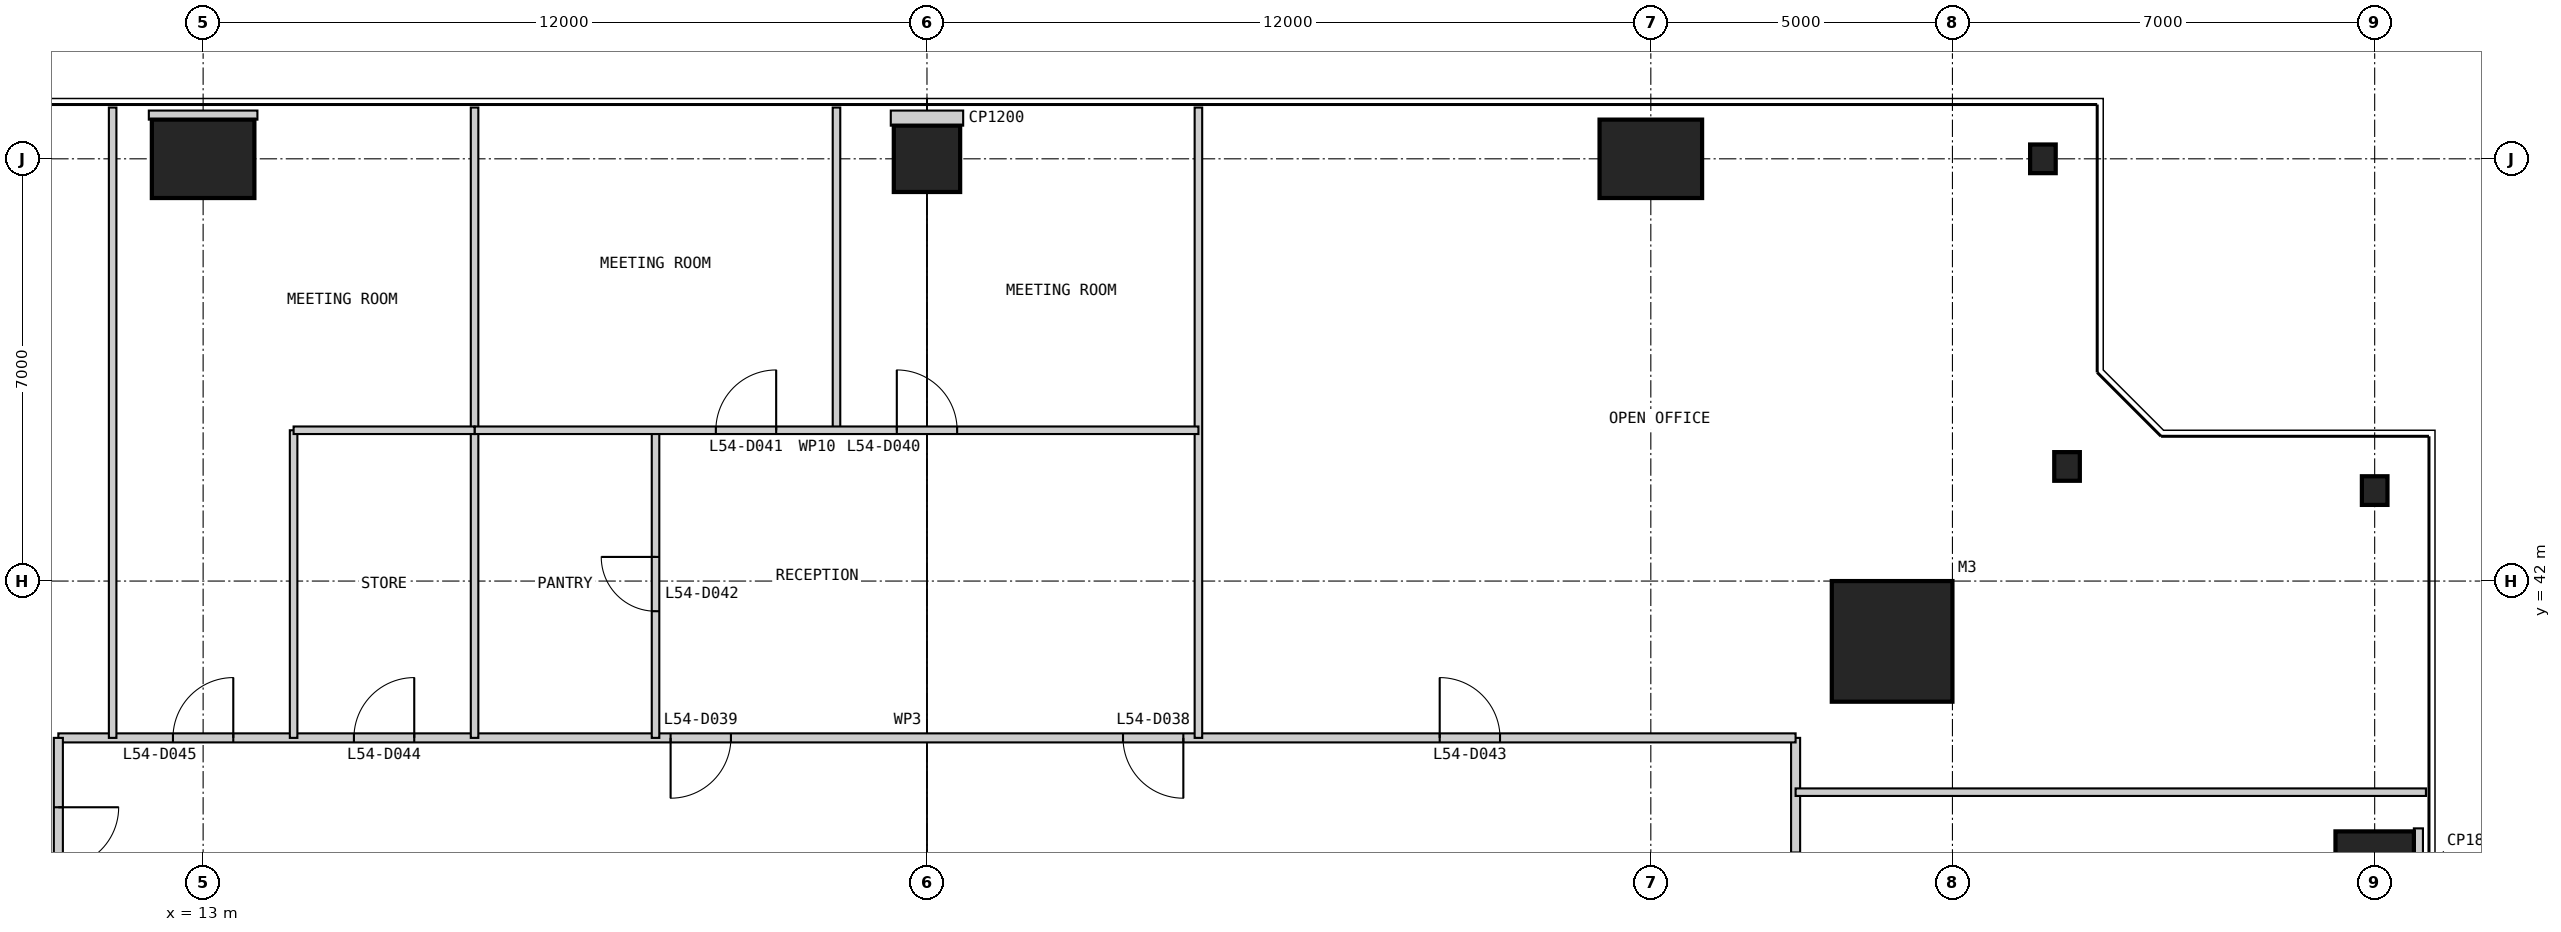
"""IFC4 building model, lengths in metres.
Left out: names, types, materials, properties, quantities, classifications, styles, units other than length and angle.
Written with IfcOpenShell. Run it as: python <this file> out.ifc"""

import sys

from ifc_helpers import new_model, si_unit, direction, frame, frame_2d, origin, origin_2d, place, context, subcontext, project, spatial, rectangle, i_section, extrude, element, fill, save


model = new_model("IFC4")
c1 = context("Model", 3, precision=1e-05, world=origin(), true_north=direction((0.0, 1.0)))
c2 = subcontext(c1, "Body", "Model", "MODEL_VIEW")
j1 = project(units=[si_unit("LENGTHUNIT", "METRE"), si_unit("PLANEANGLEUNIT", "RADIAN")], contexts=[c1])
p1 = place(None, origin())
s1 = spatial("IfcSite", under=j1, at=p1, CompositionType="ELEMENT")
p2 = place(p1, origin())
s2 = spatial("IfcBuilding", under=s1, at=p2, CompositionType="ELEMENT")
p3 = place(p2, frame((0.0, 0.0, 229.8)))
s3 = spatial("IfcBuildingStorey", under=s2, at=p3, CompositionType="ELEMENT", Elevation=229.8)
p4 = place(p3, frame((41.0, 41.0, 0.0), z_axis=(0.0, 0.0, 1.0), x_axis=(1.0, 0.0, 0.0)))
e1 = element("IfcColumn", 1, at=p4, inside=s3, PredefinedType="COLUMN", context=c2, shape_type="SweptSolid", body=[
    extrude(rectangle(XDim=2.0, YDim=2.0, at=origin_2d()), origin(), (0.0, 0.0, 1.0), 4.0),
])
p5 = place(p3, frame((49.0, 37.0, 0.0), z_axis=(0.0, 0.0, 1.0), x_axis=(1.0, 0.0, 0.0)))
e2 = element("IfcColumn", 2, at=p5, inside=s3, PredefinedType="COLUMN", context=c2, shape_type="SweptSolid", body=[
    extrude(rectangle(XDim=1.3, YDim=1.7, at=origin_2d()), origin(), (0.0, 0.0, 1.0), 4.0),
])
for number, where, z_axis, x_axis in (
    (3, (49.0, 43.5, 0.0), (0.0, 0.0, 1.0), (1.0, 0.0, 0.0)),
    (4, (43.9, 43.9, 0.0), (0.0, 0.0, 1.0), (1.0, 0.0, 0.0)),
    (5, (43.5, 49.0, 0.0), (0.0, 0.0, 1.0), (1.0, 0.0, 0.0)),
):
    element("IfcColumn", number, at=place(p3, frame(where, z_axis=z_axis, x_axis=x_axis)), inside=s3, PredefinedType="COLUMN", context=c2, shape_type="SweptSolid", body=[
        extrude(i_section(OverallWidth=0.424, OverallDepth=0.475, WebThickness=0.048, FlangeThickness=0.077, at=origin_2d()), origin(), (0.0, 0.0, 1.0), 4.0),
    ])
p6 = place(p3, frame((37.0, 49.0, 0.0), z_axis=(0.0, 0.0, 1.0), x_axis=(1.0, 0.0, 0.0)))
e6 = element("IfcColumn", 6, at=p6, inside=s3, PredefinedType="COLUMN", context=c2, shape_type="SweptSolid", body=[
    extrude(rectangle(XDim=1.7, YDim=1.3, at=origin_2d()), origin(), (0.0, 0.0, 1.0), 4.0),
])
p7 = place(p3, frame((25.0, 49.0, 0.0), z_axis=(0.0, 0.0, 1.0), x_axis=(1.0, 0.0, 0.0)))
e7 = element("IfcColumn", 7, at=p7, inside=s3, PredefinedType="COLUMN", context=c2, shape_type="SweptSolid", body=[
    extrude(rectangle(XDim=1.1, YDim=1.1, at=origin_2d()), origin(), (0.0, 0.0, 1.0), 4.0),
])
p8 = place(p3, frame((13.0, 49.0, 0.0), z_axis=(0.0, 0.0, 1.0), x_axis=(1.0, 0.0, 0.0)))
e8 = element("IfcColumn", 8, at=p8, inside=s3, PredefinedType="COLUMN", context=c2, shape_type="SweptSolid", body=[
    extrude(rectangle(XDim=1.7, YDim=1.3, at=origin_2d()), origin(), (0.0, 0.0, 1.0), 4.0),
])
p9 = place(p3, frame((39.4, 10.6, 0.0), z_axis=(0.0, 0.0, 1.0), x_axis=(0.0, 1.0, 0.0)))
e9 = element("IfcWall", 9, at=p9, inside=s3, PredefinedType="PARTITIONING", context=c2, shape_type="SweptSolid", body=[
    extrude(rectangle(XDim=28.8, YDim=0.15, at=frame_2d((14.4, 0.0))), origin(), (0.0, 0.0, 1.0), 3.8),
])
p10 = place(p9, frame((10.15, 0.0, 0.0)))
e10 = element("IfcOpeningElement", 10, at=p10, cuts=e9, PredefinedType="OPENING", context=c2, shape_type="SweptSolid", body=[
    extrude(rectangle(XDim=1.0, YDim=2.2, at=frame_2d((0.5, 1.1))), frame((0.0, 0.085, 0.0), z_axis=(0.0, -1.0, 0.0), x_axis=(1.0, 0.0, 0.0)), (0.0, 0.0, 1.0), 0.17),
])
p11 = place(p9, frame((17.65, 0.0, 0.0)))
e11 = element("IfcOpeningElement", 11, at=p11, cuts=e9, PredefinedType="OPENING", context=c2, shape_type="SweptSolid", body=[
    extrude(rectangle(XDim=1.0, YDim=2.2, at=frame_2d((0.5, 1.1))), frame((0.0, 0.085, 0.0), z_axis=(0.0, -1.0, 0.0), x_axis=(1.0, 0.0, 0.0)), (0.0, 0.0, 1.0), 0.17),
])
p12 = place(p9, frame((4.9, 0.0, 0.0)))
e12 = element("IfcOpeningElement", 12, at=p12, cuts=e9, PredefinedType="OPENING", context=c2, shape_type="SweptSolid", body=[
    extrude(rectangle(XDim=1.0, YDim=2.2, at=frame_2d((0.5, 1.1))), frame((0.0, 0.085, 0.0), z_axis=(0.0, -1.0, 0.0), x_axis=(1.0, 0.0, 0.0)), (0.0, 0.0, 1.0), 0.17),
])
p13 = place(p9, frame((22.9, 0.0, 0.0)))
e13 = element("IfcOpeningElement", 13, at=p13, cuts=e9, PredefinedType="OPENING", context=c2, shape_type="SweptSolid", body=[
    extrude(rectangle(XDim=1.0, YDim=2.2, at=frame_2d((0.5, 1.1))), frame((0.0, 0.085, 0.0), z_axis=(0.0, -1.0, 0.0), x_axis=(1.0, 0.0, 0.0)), (0.0, 0.0, 1.0), 0.17),
])
p14 = place(p9, frame((25.9, 0.0, 0.0)))
e14 = element("IfcOpeningElement", 14, at=p14, cuts=e9, PredefinedType="OPENING", context=c2, shape_type="SweptSolid", body=[
    extrude(rectangle(XDim=1.0, YDim=2.2, at=frame_2d((0.5, 1.1))), frame((0.0, 0.085, 0.0), z_axis=(0.0, -1.0, 0.0), x_axis=(1.0, 0.0, 0.0)), (0.0, 0.0, 1.0), 0.17),
])
p15 = place(p3, frame((39.4, 39.4, 0.0), z_axis=(0.0, 0.0, 1.0), x_axis=(-1.0, 0.0, 0.0)))
e15 = element("IfcWall", 15, at=p15, inside=s3, PredefinedType="PARTITIONING", context=c2, shape_type="SweptSolid", body=[
    extrude(rectangle(XDim=28.8, YDim=0.15, at=frame_2d((14.4, 0.0))), origin(), (0.0, 0.0, 1.0), 3.8),
])
p16 = place(p15, frame((10.15, 0.0, 0.0)))
e16 = element("IfcOpeningElement", 16, at=p16, cuts=e15, PredefinedType="OPENING", context=c2, shape_type="SweptSolid", body=[
    extrude(rectangle(XDim=1.0, YDim=2.2, at=frame_2d((0.5, 1.1))), frame((0.0, 0.085, 0.0), z_axis=(0.0, -1.0, 0.0), x_axis=(1.0, 0.0, 0.0)), (0.0, 0.0, 1.0), 0.17),
])
p17 = place(p15, frame((17.65, 0.0, 0.0)))
e17 = element("IfcOpeningElement", 17, at=p17, cuts=e15, PredefinedType="OPENING", context=c2, shape_type="SweptSolid", body=[
    extrude(rectangle(XDim=1.0, YDim=2.2, at=frame_2d((0.5, 1.1))), frame((0.0, 0.085, 0.0), z_axis=(0.0, -1.0, 0.0), x_axis=(1.0, 0.0, 0.0)), (0.0, 0.0, 1.0), 0.17),
])
p18 = place(p15, frame((4.9, 0.0, 0.0)))
e18 = element("IfcOpeningElement", 18, at=p18, cuts=e15, PredefinedType="OPENING", context=c2, shape_type="SweptSolid", body=[
    extrude(rectangle(XDim=1.0, YDim=2.2, at=frame_2d((0.5, 1.1))), frame((0.0, 0.085, 0.0), z_axis=(0.0, -1.0, 0.0), x_axis=(1.0, 0.0, 0.0)), (0.0, 0.0, 1.0), 0.17),
])
p19 = place(p15, frame((22.9, 0.0, 0.0)))
e19 = element("IfcOpeningElement", 19, at=p19, cuts=e15, PredefinedType="OPENING", context=c2, shape_type="SweptSolid", body=[
    extrude(rectangle(XDim=1.0, YDim=2.2, at=frame_2d((0.5, 1.1))), frame((0.0, 0.085, 0.0), z_axis=(0.0, -1.0, 0.0), x_axis=(1.0, 0.0, 0.0)), (0.0, 0.0, 1.0), 0.17),
])
p20 = place(p15, frame((25.9, 0.0, 0.0)))
e20 = element("IfcOpeningElement", 20, at=p20, cuts=e15, PredefinedType="OPENING", context=c2, shape_type="SweptSolid", body=[
    extrude(rectangle(XDim=1.0, YDim=2.2, at=frame_2d((0.5, 1.1))), frame((0.0, 0.085, 0.0), z_axis=(0.0, -1.0, 0.0), x_axis=(1.0, 0.0, 0.0)), (0.0, 0.0, 1.0), 0.17),
])
for number, where, z_axis, x_axis in (
    (21, (49.85, 38.5, 0.0), (0.0, 0.0, 1.0), (-1.0, 0.0, 0.0)),
    (22, (29.5, 49.85, 0.0), (0.0, 0.0, 1.0), (0.0, -1.0, 0.0)),
):
    element("IfcWall", number, at=place(p3, frame(where, z_axis=z_axis, x_axis=x_axis)), inside=s3, PredefinedType="PARTITIONING", context=c2, shape_type="SweptSolid", body=[
        extrude(rectangle(XDim=10.45, YDim=0.125, at=frame_2d((5.225, 0.0))), origin(), (0.0, 0.0, 1.0), 3.8),
    ])
p21 = place(p3, frame((23.5, 49.85, 0.0), z_axis=(0.0, 0.0, 1.0), x_axis=(0.0, -1.0, 0.0)))
e23 = element("IfcWall", 23, at=p21, inside=s3, PredefinedType="PARTITIONING", context=c2, shape_type="SweptSolid", body=[
    extrude(rectangle(XDim=5.35, YDim=0.125, at=frame_2d((2.675, 0.0))), origin(), (0.0, 0.0, 1.0), 3.8),
])
p22 = place(p3, frame((20.5, 44.5, 0.0), z_axis=(0.0, 0.0, 1.0), x_axis=(0.0, -1.0, 0.0)))
e24 = element("IfcWall", 24, at=p22, inside=s3, PredefinedType="PARTITIONING", context=c2, shape_type="SweptSolid", body=[
    extrude(rectangle(XDim=5.1, YDim=0.125, at=frame_2d((2.55, 0.0))), origin(), (0.0, 0.0, 1.0), 3.8),
])
p23 = place(p22, frame((2.1, 0.0, 0.0)))
e25 = element("IfcOpeningElement", 25, at=p23, cuts=e24, PredefinedType="OPENING", context=c2, shape_type="SweptSolid", body=[
    extrude(rectangle(XDim=0.9, YDim=2.2, at=frame_2d((0.45, 1.1))), frame((0.0, 0.073, 0.0), z_axis=(0.0, -1.0, 0.0), x_axis=(1.0, 0.0, 0.0)), (0.0, 0.0, 1.0), 0.145),
])
p24 = place(p3, frame((17.5, 49.85, 0.0), z_axis=(0.0, 0.0, 1.0), x_axis=(0.0, -1.0, 0.0)))
e26 = element("IfcWall", 26, at=p24, inside=s3, PredefinedType="PARTITIONING", context=c2, shape_type="SweptSolid", body=[
    extrude(rectangle(XDim=10.45, YDim=0.125, at=frame_2d((5.225, 0.0))), origin(), (0.0, 0.0, 1.0), 3.8),
])
p25 = place(p3, frame((14.5, 44.5, 0.0), z_axis=(0.0, 0.0, 1.0), x_axis=(0.0, -1.0, 0.0)))
e27 = element("IfcWall", 27, at=p25, inside=s3, PredefinedType="PARTITIONING", context=c2, shape_type="SweptSolid", body=[
    extrude(rectangle(XDim=5.1, YDim=0.125, at=frame_2d((2.55, 0.0))), origin(), (0.0, 0.0, 1.0), 3.8),
])
p26 = place(p3, frame((29.5, 44.5, 0.0), z_axis=(0.0, 0.0, 1.0), x_axis=(-1.0, 0.0, 0.0)))
e28 = element("IfcWall", 28, at=p26, inside=s3, PredefinedType="PARTITIONING", context=c2, shape_type="SweptSolid", body=[
    extrude(rectangle(XDim=12.0, YDim=0.125, at=frame_2d((6.0, 0.0))), origin(), (0.0, 0.0, 1.0), 3.8),
])
p27 = place(p26, frame((4.0, 0.0, 0.0)))
e29 = element("IfcOpeningElement", 29, at=p27, cuts=e28, PredefinedType="OPENING", context=c2, shape_type="SweptSolid", body=[
    extrude(rectangle(XDim=1.0, YDim=2.2, at=frame_2d((0.5, 1.1))), frame((0.0, 0.073, 0.0), z_axis=(0.0, -1.0, 0.0), x_axis=(1.0, 0.0, 0.0)), (0.0, 0.0, 1.0), 0.145),
])
p28 = place(p26, frame((7.0, 0.0, 0.0)))
e30 = element("IfcOpeningElement", 30, at=p28, cuts=e28, PredefinedType="OPENING", context=c2, shape_type="SweptSolid", body=[
    extrude(rectangle(XDim=1.0, YDim=2.2, at=frame_2d((0.5, 1.1))), frame((0.0, 0.073, 0.0), z_axis=(0.0, -1.0, 0.0), x_axis=(1.0, 0.0, 0.0)), (0.0, 0.0, 1.0), 0.145),
])
p29 = place(p3, frame((17.5, 44.5, 0.0), z_axis=(0.0, 0.0, 1.0), x_axis=(-1.0, 0.0, 0.0)))
e31 = element("IfcWall", 31, at=p29, inside=s3, PredefinedType="PARTITIONING", context=c2, shape_type="SweptSolid", body=[
    extrude(rectangle(XDim=3.0, YDim=0.125, at=frame_2d((1.5, 0.0))), origin(), (0.0, 0.0, 1.0), 3.8),
])
p30 = place(p3, frame((10.6, 39.4, 0.0), z_axis=(0.0, 0.0, 1.0), x_axis=(0.0, -1.0, 0.0)))
e32 = element("IfcWall", 32, at=p30, inside=s3, PredefinedType="PARTITIONING", context=c2, shape_type="SweptSolid", body=[
    extrude(rectangle(XDim=28.8, YDim=0.15, at=frame_2d((14.4, 0.0))), origin(), (0.0, 0.0, 1.0), 3.8),
])
p31 = place(p30, frame((1.15, 0.0, 0.0)))
e33 = element("IfcOpeningElement", 33, at=p31, cuts=e32, PredefinedType="OPENING", context=c2, shape_type="SweptSolid", body=[
    extrude(rectangle(XDim=1.0, YDim=2.2, at=frame_2d((0.5, 1.1))), frame((0.0, 0.085, 0.0), z_axis=(0.0, -1.0, 0.0), x_axis=(1.0, 0.0, 0.0)), (0.0, 0.0, 1.0), 0.17),
])
p32 = place(p30, frame((23.65, 0.0, 0.0)))
e34 = element("IfcOpeningElement", 34, at=p32, cuts=e32, PredefinedType="OPENING", context=c2, shape_type="SweptSolid", body=[
    extrude(rectangle(XDim=1.0, YDim=2.2, at=frame_2d((0.5, 1.1))), frame((0.0, 0.085, 0.0), z_axis=(0.0, -1.0, 0.0), x_axis=(1.0, 0.0, 0.0)), (0.0, 0.0, 1.0), 0.17),
])
p33 = place(p3, frame((11.5, 49.85, 0.0), z_axis=(0.0, 0.0, 1.0), x_axis=(0.0, -1.0, 0.0)))
e35 = element("IfcWall", 35, at=p33, inside=s3, PredefinedType="PARTITIONING", context=c2, shape_type="SweptSolid", body=[
    extrude(rectangle(XDim=10.45, YDim=0.125, at=frame_2d((5.225, 0.0))), origin(), (0.0, 0.0, 1.0), 3.8),
])
p34 = place(p3, frame((49.8, 37.0, 0.0), z_axis=(0.0, 0.0, 1.0), x_axis=(-1.0, 0.0, 0.0)))
e36 = element("IfcWall", 36, at=p34, inside=s3, PredefinedType="PARTITIONING", context=c2, shape_type="SweptSolid", body=[
    extrude(rectangle(XDim=0.15, YDim=1.8, at=frame_2d((0.075, 0.0))), origin(), (0.0, 0.0, 1.0), 3.8),
])
p35 = place(p3, frame((25.0, 49.8, 0.0), z_axis=(0.0, 0.0, 1.0), x_axis=(0.0, -1.0, 0.0)))
e37 = element("IfcWall", 37, at=p35, inside=s3, PredefinedType="PARTITIONING", context=c2, shape_type="SweptSolid", body=[
    extrude(rectangle(XDim=0.25, YDim=1.2, at=frame_2d((0.125, 0.0))), origin(), (0.0, 0.0, 1.0), 3.8),
])
p36 = place(p3, frame((13.0, 49.8, 0.0), z_axis=(0.0, 0.0, 1.0), x_axis=(0.0, -1.0, 0.0)))
e38 = element("IfcWall", 38, at=p36, inside=s3, PredefinedType="PARTITIONING", context=c2, shape_type="SweptSolid", body=[
    extrude(rectangle(XDim=0.15, YDim=1.8, at=frame_2d((0.075, 0.0))), origin(), (0.0, 0.0, 1.0), 3.8),
])
p37 = place(p16, origin())
e39 = element("IfcDoor", 39, at=p37, inside=s3, OperationType="SINGLE_SWING_LEFT", PredefinedType="DOOR", context=c2, shape_type="SweptSolid", body=[
    extrude(rectangle(XDim=1.0, YDim=2.2, at=frame_2d((0.5, 1.1))), frame((0.0, 0.025, 0.0), z_axis=(0.0, -1.0, 0.0), x_axis=(1.0, 0.0, 0.0)), (0.0, 0.0, 1.0), 0.05),
])
fill(e16, e39)
p38 = place(p17, origin())
e40 = element("IfcDoor", 40, at=p38, inside=s3, OperationType="SINGLE_SWING_RIGHT", PredefinedType="DOOR", context=c2, shape_type="SweptSolid", body=[
    extrude(rectangle(XDim=1.0, YDim=2.2, at=frame_2d((0.5, 1.1))), frame((0.0, 0.025, 0.0), z_axis=(0.0, -1.0, 0.0), x_axis=(1.0, 0.0, 0.0)), (0.0, 0.0, 1.0), 0.05),
])
fill(e17, e40)
p39 = place(p27, frame((1.0, 0.0, 0.0), z_axis=(0.0, 0.0, 1.0), x_axis=(-1.0, 0.0, 0.0)))
e41 = element("IfcDoor", 41, at=p39, inside=s3, OperationType="SINGLE_SWING_LEFT", PredefinedType="DOOR", context=c2, shape_type="SweptSolid", body=[
    extrude(rectangle(XDim=1.0, YDim=2.2, at=frame_2d((0.5, 1.1))), frame((0.0, 0.025, 0.0), z_axis=(0.0, -1.0, 0.0), x_axis=(1.0, 0.0, 0.0)), (0.0, 0.0, 1.0), 0.05),
])
fill(e29, e41)
p40 = place(p28, frame((1.0, 0.0, 0.0), z_axis=(0.0, 0.0, 1.0), x_axis=(-1.0, 0.0, 0.0)))
e42 = element("IfcDoor", 42, at=p40, inside=s3, OperationType="SINGLE_SWING_RIGHT", PredefinedType="DOOR", context=c2, shape_type="SweptSolid", body=[
    extrude(rectangle(XDim=1.0, YDim=2.2, at=frame_2d((0.5, 1.1))), frame((0.0, 0.025, 0.0), z_axis=(0.0, -1.0, 0.0), x_axis=(1.0, 0.0, 0.0)), (0.0, 0.0, 1.0), 0.05),
])
fill(e30, e42)
p41 = place(p23, frame((0.9, 0.0, 0.0), z_axis=(0.0, 0.0, 1.0), x_axis=(-1.0, 0.0, 0.0)))
e43 = element("IfcDoor", 43, at=p41, inside=s3, OperationType="SINGLE_SWING_RIGHT", PredefinedType="DOOR", context=c2, shape_type="SweptSolid", body=[
    extrude(rectangle(XDim=0.9, YDim=2.2, at=frame_2d((0.45, 1.1))), frame((0.0, 0.025, 0.0), z_axis=(0.0, -1.0, 0.0), x_axis=(1.0, 0.0, 0.0)), (0.0, 0.0, 1.0), 0.05),
])
fill(e25, e43)
p42 = place(p18, frame((1.0, 0.0, 0.0), z_axis=(0.0, 0.0, 1.0), x_axis=(-1.0, 0.0, 0.0)))
e44 = element("IfcDoor", 44, at=p42, inside=s3, OperationType="SINGLE_SWING_LEFT", PredefinedType="DOOR", context=c2, shape_type="SweptSolid", body=[
    extrude(rectangle(XDim=1.0, YDim=2.2, at=frame_2d((0.5, 1.1))), frame((0.0, 0.025, 0.0), z_axis=(0.0, -1.0, 0.0), x_axis=(1.0, 0.0, 0.0)), (0.0, 0.0, 1.0), 0.05),
])
fill(e18, e44)
p43 = place(p19, frame((1.0, 0.0, 0.0), z_axis=(0.0, 0.0, 1.0), x_axis=(-1.0, 0.0, 0.0)))
e45 = element("IfcDoor", 45, at=p43, inside=s3, OperationType="SINGLE_SWING_RIGHT", PredefinedType="DOOR", context=c2, shape_type="SweptSolid", body=[
    extrude(rectangle(XDim=1.0, YDim=2.2, at=frame_2d((0.5, 1.1))), frame((0.0, 0.025, 0.0), z_axis=(0.0, -1.0, 0.0), x_axis=(1.0, 0.0, 0.0)), (0.0, 0.0, 1.0), 0.05),
])
fill(e19, e45)
p44 = place(p20, frame((1.0, 0.0, 0.0), z_axis=(0.0, 0.0, 1.0), x_axis=(-1.0, 0.0, 0.0)))
e46 = element("IfcDoor", 46, at=p44, inside=s3, OperationType="SINGLE_SWING_RIGHT", PredefinedType="DOOR", context=c2, shape_type="SweptSolid", body=[
    extrude(rectangle(XDim=1.0, YDim=2.2, at=frame_2d((0.5, 1.1))), frame((0.0, 0.025, 0.0), z_axis=(0.0, -1.0, 0.0), x_axis=(1.0, 0.0, 0.0)), (0.0, 0.0, 1.0), 0.05),
])
fill(e20, e46)
p45 = place(p31, origin())
e47 = element("IfcDoor", 47, at=p45, inside=s3, OperationType="SINGLE_SWING_LEFT", PredefinedType="DOOR", context=c2, shape_type="SweptSolid", body=[
    extrude(rectangle(XDim=1.0, YDim=2.2, at=frame_2d((0.5, 1.1))), frame((0.0, 0.025, 0.0), z_axis=(0.0, -1.0, 0.0), x_axis=(1.0, 0.0, 0.0)), (0.0, 0.0, 1.0), 0.05),
])
fill(e33, e47)
save(model, sys.argv[1])
